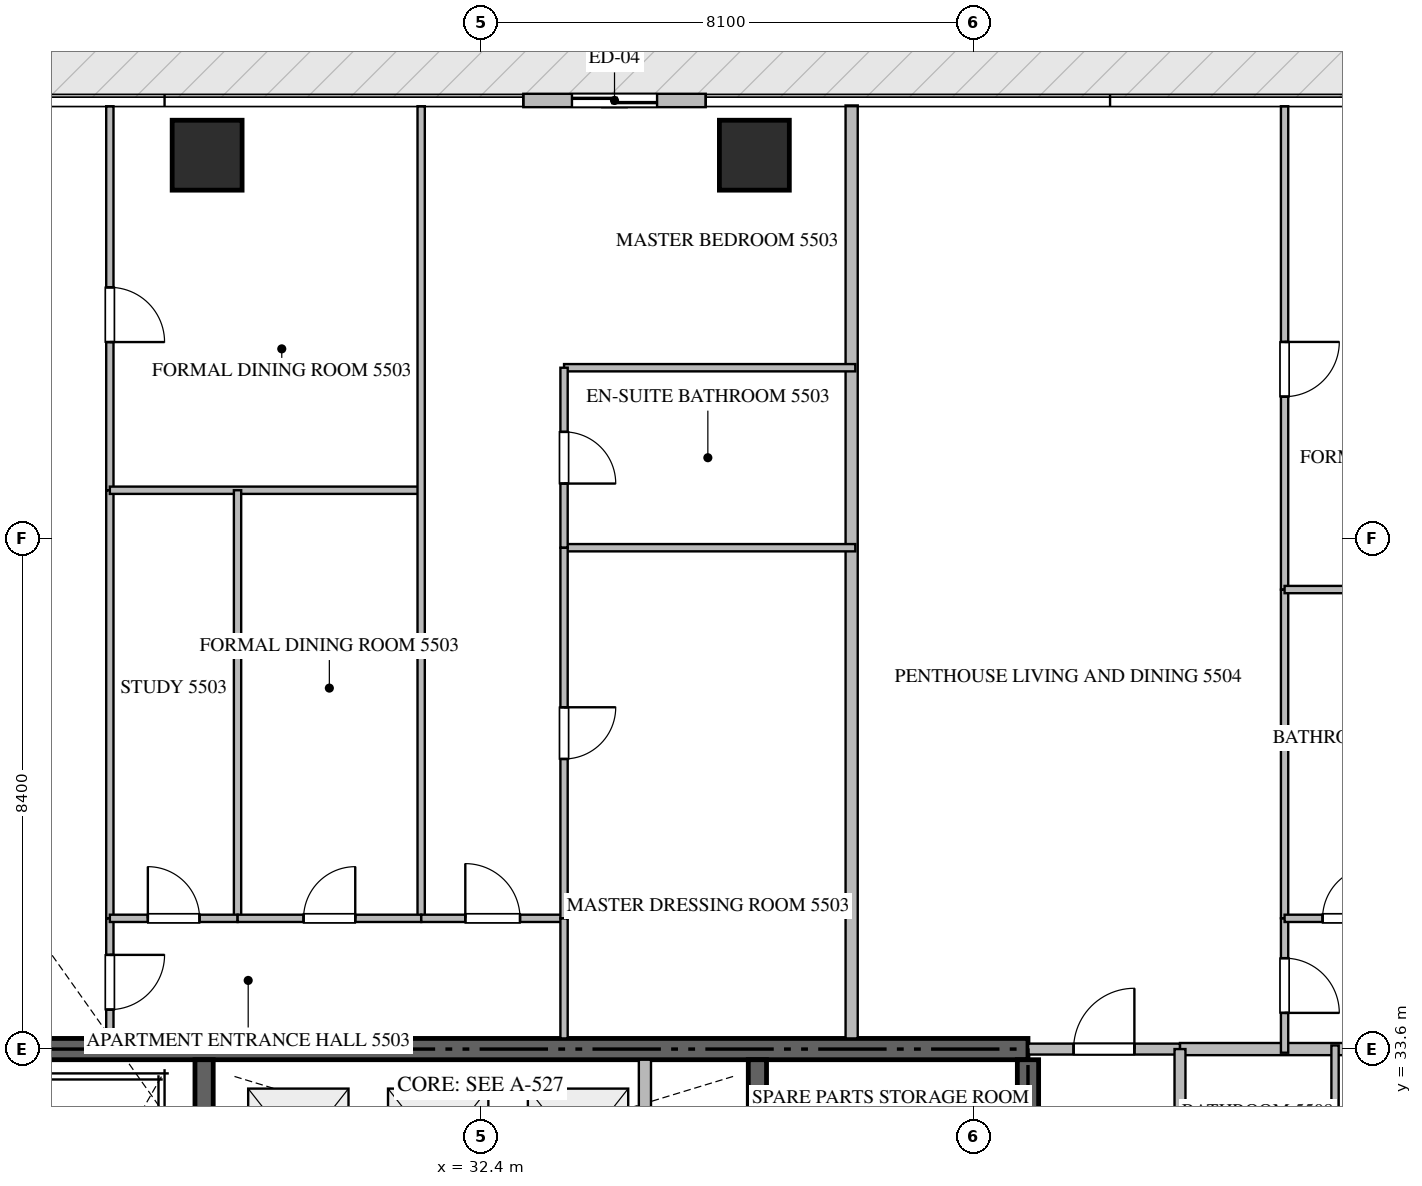
"""IFC4 building model, lengths in metres.
Left out: names, types, materials, properties, quantities, classifications, styles, units other than length and angle.
Written with IfcOpenShell. Run it as: python <this file> out.ifc"""

import sys

from ifc_helpers import new_model, si_unit, direction, frame, frame_2d, origin, origin_2d, place, context, subcontext, project, spatial, rectangle, extrude, source, transform, mapped, element, fill, save


model = new_model("IFC4")
c1 = context("Model", 3, precision=1e-05, world=origin(), true_north=direction((0.0, 1.0)))
c2 = subcontext(c1, "Body", "Model", "MODEL_VIEW")
j1 = project(units=[si_unit("LENGTHUNIT", "METRE"), si_unit("PLANEANGLEUNIT", "RADIAN")], contexts=[c1])
p1 = place(None, origin())
s1 = spatial("IfcSite", under=j1, at=p1, CompositionType="ELEMENT")
p2 = place(p1, origin())
s2 = spatial("IfcBuilding", under=s1, at=p2, CompositionType="ELEMENT")
p3 = place(p2, frame((0.0, 0.0, 222.0)))
s3 = spatial("IfcBuildingStorey", under=s2, at=p3, CompositionType="ELEMENT", Elevation=222.0)
p4 = place(p3, frame((41.4, 33.6, -0.26), z_axis=(0.0, 0.0, 1.0), x_axis=(-1.0, 0.0, 0.0)))
e1 = element("IfcWall", 1, at=p4, inside=s3, PredefinedType="SHEAR", context=c2, shape_type="SweptSolid", body=[
    extrude(rectangle(XDim=18.0, YDim=0.35, at=frame_2d((9.0, 0.0))), origin(), (0.0, 0.0, 1.0), 3.848),
])
p5 = place(p3, frame((41.4, 27.75, -0.26), z_axis=(0.0, 0.0, 1.0), x_axis=(0.0, 1.0, 0.0)))
e2 = element("IfcWall", 2, at=p5, inside=s3, PredefinedType="SHEAR", context=c2, shape_type="SweptSolid", body=[
    extrude(rectangle(XDim=5.675, YDim=0.35, at=frame_2d((2.837, 0.0))), origin(), (0.0, 0.0, 1.0), 3.848),
])
p6 = place(p3, frame((27.85, 23.55, -0.26), z_axis=(0.0, 0.0, 1.0), x_axis=(0.0, 1.0, 0.0)))
e3 = element("IfcWall", 3, at=p6, inside=s3, PredefinedType="SHEAR", context=c2, shape_type="SweptSolid", body=[
    extrude(rectangle(XDim=9.875, YDim=0.3, at=frame_2d((4.938, 0.0))), origin(), (0.0, 0.0, 1.0), 3.848),
])
p7 = place(p3, frame((36.95, 27.05, -0.26), z_axis=(0.0, 0.0, 1.0), x_axis=(0.0, 1.0, 0.0)))
e4 = element("IfcWall", 4, at=p7, inside=s3, PredefinedType="SHEAR", context=c2, shape_type="SweptSolid", body=[
    extrude(rectangle(XDim=6.375, YDim=0.3, at=frame_2d((3.188, 0.0))), origin(), (0.0, 0.0, 1.0), 3.848),
])
m1 = source(origin(), c2, "Body", "SweptSolid", [
    extrude(rectangle(XDim=1.15, YDim=1.15, at=origin_2d()), origin(), (0.0, 0.0, 1.0), 3.85),
])
for number, where, z_axis, x_axis in (
    (5, (27.9, 48.3, -0.26), (0.0, 0.0, 1.0), (1.0, 0.0, 0.0)),
    (6, (36.9, 48.3, -0.26), (0.0, 0.0, 1.0), (1.0, 0.0, 0.0)),
):
    element("IfcColumn", number, at=place(p3, frame(where, z_axis=z_axis, x_axis=x_axis)), inside=s3, PredefinedType="COLUMN", context=c2, shape_type="MappedRepresentation", body=[
        mapped(m1, transform((0.0, 0.0, 0.0), scale=1.0)),
    ])
p8 = place(p3, frame((36.1, 49.2, 0.0), z_axis=(0.0, 0.0, 1.0), x_axis=(-1.0, 0.0, 0.0)))
e7 = element("IfcWall", 7, at=p8, inside=s3, PredefinedType="ELEMENTEDWALL", context=c2, shape_type="SweptSolid", body=[
    extrude(rectangle(XDim=3.0, YDim=0.22, at=frame_2d((1.5, 0.0))), origin(), (0.0, 0.0, 1.0), 3.575),
])
p9 = place(p8, frame((0.8, 0.0, 0.0)))
e8 = element("IfcOpeningElement", 8, at=p9, cuts=e7, PredefinedType="OPENING", context=c2, shape_type="SweptSolid", body=[
    extrude(rectangle(XDim=1.4, YDim=2.25, at=frame_2d((0.7, 1.125))), frame((0.0, 0.12, 0.0), z_axis=(0.0, -1.0, 0.0), x_axis=(1.0, 0.0, 0.0)), (0.0, 0.0, 1.0), 0.24),
])
p10 = place(p3, frame((35.1, 30.75, 0.0), z_axis=(0.0, 0.0, 1.0), x_axis=(0.0, 1.0, 0.0)))
e9 = element("IfcWall", 9, at=p10, inside=s3, PredefinedType="STANDARD", context=c2, shape_type="SweptSolid", body=[
    extrude(rectangle(XDim=2.675, YDim=0.2, at=frame_2d((1.337, 0.0))), origin(), (0.0, 0.0, 1.0), 3.59),
])
p11 = place(p3, frame((38.5, 33.775, 0.0), z_axis=(0.0, 0.0, 1.0), x_axis=(0.0, 1.0, 0.0)))
e10 = element("IfcWall", 10, at=p11, inside=s3, PredefinedType="PARTITIONING", context=c2, shape_type="SweptSolid", body=[
    extrude(rectangle(XDim=15.343, YDim=0.2, at=frame_2d((7.671, 0.0))), origin(), (0.0, 0.0, 1.0), 3.59),
])
p12 = place(p3, frame((43.9, 33.6, 0.0), z_axis=(0.0, 0.0, 1.0), x_axis=(1.0, 0.0, 0.0)))
e11 = element("IfcWall", 11, at=p12, inside=s3, PredefinedType="PARTITIONING", context=c2, shape_type="SweptSolid", body=[
    extrude(rectangle(XDim=13.418, YDim=0.2, at=frame_2d((6.709, 0.0))), origin(), (0.0, 0.0, 1.0), 3.59),
])
p13 = place(p3, frame((41.402, 33.6, 0.0), z_axis=(0.0, 0.0, 1.0), x_axis=(1.0, 0.0, 0.0)))
e12 = element("IfcWall", 12, at=p13, inside=s3, PredefinedType="PARTITIONING", context=c2, shape_type="SweptSolid", body=[
    extrude(rectangle(XDim=2.496, YDim=0.18, at=frame_2d((1.248, 0.0))), origin(), (0.0, 0.0, 1.0), 3.59),
])
p14 = place(p13, frame((0.748, 0.0, 0.0)))
e13 = element("IfcOpeningElement", 13, at=p14, cuts=e12, PredefinedType="OPENING", context=c2, shape_type="SweptSolid", body=[
    extrude(rectangle(XDim=1.0, YDim=2.15, at=frame_2d((0.5, 1.075))), frame((0.0, 0.1, 0.0), z_axis=(0.0, -1.0, 0.0), x_axis=(1.0, 0.0, 0.0)), (0.0, 0.0, 1.0), 0.2),
])
p15 = place(p3, frame((43.9, 16.8, 0.0), z_axis=(0.0, 0.0, 1.0), x_axis=(0.0, 1.0, 0.0)))
e14 = element("IfcWall", 14, at=p15, inside=s3, PredefinedType="PARTITIONING", context=c2, shape_type="SweptSolid", body=[
    extrude(rectangle(XDim=16.8, YDim=0.18, at=frame_2d((8.4, 0.0))), origin(), (0.0, 0.0, 1.0), 3.59),
])
p16 = place(p15, frame((2.575, 0.0, 0.0)))
e15 = element("IfcOpeningElement", 15, at=p16, cuts=e14, PredefinedType="OPENING", context=c2, shape_type="SweptSolid", body=[
    extrude(rectangle(XDim=1.0, YDim=2.15, at=frame_2d((0.5, 1.075))), frame((0.0, 0.1, 0.0), z_axis=(0.0, -1.0, 0.0), x_axis=(1.0, 0.0, 0.0)), (0.0, 0.0, 1.0), 0.2),
])
p17 = place(p15, frame((10.997, 0.0, 0.0)))
e16 = element("IfcOpeningElement", 16, at=p17, cuts=e14, PredefinedType="OPENING", context=c2, shape_type="SweptSolid", body=[
    extrude(rectangle(XDim=1.0, YDim=2.15, at=frame_2d((0.5, 1.075))), frame((0.0, 0.1, 0.0), z_axis=(0.0, -1.0, 0.0), x_axis=(1.0, 0.0, 0.0)), (0.0, 0.0, 1.0), 0.2),
])
p18 = place(p3, frame((26.3, 35.75, 0.0), z_axis=(0.0, 0.0, 1.0), x_axis=(0.0, -1.0, 0.0)))
e17 = element("IfcWall", 17, at=p18, inside=s3, PredefinedType="PARTITIONING", context=c2, shape_type="SweptSolid", body=[
    extrude(rectangle(XDim=1.975, YDim=0.12, at=frame_2d((0.988, 0.0))), origin(), (0.0, 0.0, 1.0), 3.59),
])
p19 = place(p18, frame((0.601, 0.0, 0.0)))
e18 = element("IfcOpeningElement", 18, at=p19, cuts=e17, PredefinedType="OPENING", context=c2, shape_type="SweptSolid", body=[
    extrude(rectangle(XDim=0.9, YDim=2.1, at=frame_2d((0.45, 1.05))), frame((0.0, 0.07, 0.0), z_axis=(0.0, -1.0, 0.0), x_axis=(1.0, 0.0, 0.0)), (0.0, 0.0, 1.0), 0.14),
])
p20 = place(p3, frame((26.3, 49.105, 0.0), z_axis=(0.0, 0.0, 1.0), x_axis=(0.0, -1.0, 0.0)))
e19 = element("IfcWall", 19, at=p20, inside=s3, PredefinedType="PARTITIONING", context=c2, shape_type="SweptSolid", body=[
    extrude(rectangle(XDim=6.315, YDim=0.12, at=frame_2d((3.157, 0.0))), origin(), (0.0, 0.0, 1.0), 3.59),
])
p21 = place(p20, frame((2.978, 0.0, 0.0)))
e20 = element("IfcOpeningElement", 20, at=p21, cuts=e19, PredefinedType="OPENING", context=c2, shape_type="SweptSolid", body=[
    extrude(rectangle(XDim=0.9, YDim=2.1, at=frame_2d((0.45, 1.05))), frame((0.0, 0.07, 0.0), z_axis=(0.0, -1.0, 0.0), x_axis=(1.0, 0.0, 0.0)), (0.0, 0.0, 1.0), 0.14),
])
p22 = place(p3, frame((26.3, 42.788, 0.0), z_axis=(0.0, 0.0, 1.0), x_axis=(0.0, -1.0, 0.0)))
e21 = element("IfcWall", 21, at=p22, inside=s3, PredefinedType="PARTITIONING", context=c2, shape_type="SweptSolid", body=[
    extrude(rectangle(XDim=7.036, YDim=0.12, at=frame_2d((3.518, 0.0))), origin(), (0.0, 0.0, 1.0), 3.59),
])
p23 = place(p3, frame((26.3, 42.79, 0.0), z_axis=(0.0, 0.0, 1.0), x_axis=(1.0, 0.0, 0.0)))
e22 = element("IfcWall", 22, at=p23, inside=s3, PredefinedType="PARTITIONING", context=c2, shape_type="SweptSolid", body=[
    extrude(rectangle(XDim=5.12, YDim=0.12, at=frame_2d((2.56, 0.0))), origin(), (0.0, 0.0, 1.0), 3.59),
])
p24 = place(p3, frame((31.42, 49.105, 0.0), z_axis=(0.0, 0.0, 1.0), x_axis=(0.0, -1.0, 0.0)))
e23 = element("IfcWall", 23, at=p24, inside=s3, PredefinedType="PARTITIONING", context=c2, shape_type="SweptSolid", body=[
    extrude(rectangle(XDim=13.355, YDim=0.12, at=frame_2d((6.677, 0.0))), origin(), (0.0, 0.0, 1.0), 3.59),
])
p25 = place(p3, frame((28.4, 42.79, 0.0), z_axis=(0.0, 0.0, 1.0), x_axis=(0.0, -1.0, 0.0)))
e24 = element("IfcWall", 24, at=p25, inside=s3, PredefinedType="PARTITIONING", context=c2, shape_type="SweptSolid", body=[
    extrude(rectangle(XDim=7.04, YDim=0.12, at=frame_2d((3.52, 0.0))), origin(), (0.0, 0.0, 1.0), 3.59),
])
p26 = place(p3, frame((26.3, 35.75, 0.0), z_axis=(0.0, 0.0, 1.0), x_axis=(1.0, 0.0, 0.0)))
e25 = element("IfcWall", 25, at=p26, inside=s3, PredefinedType="PARTITIONING", context=c2, shape_type="SweptSolid", body=[
    extrude(rectangle(XDim=2.1, YDim=0.12, at=frame_2d((1.05, 0.0))), origin(), (0.0, 0.0, 1.0), 3.59),
])
p27 = place(p26, frame((0.625, 0.0, 0.0)))
e26 = element("IfcOpeningElement", 26, at=p27, cuts=e25, PredefinedType="OPENING", context=c2, shape_type="SweptSolid", body=[
    extrude(rectangle(XDim=0.85, YDim=2.1, at=frame_2d((0.425, 1.05))), frame((0.0, 0.07, 0.0), z_axis=(0.0, -1.0, 0.0), x_axis=(1.0, 0.0, 0.0)), (0.0, 0.0, 1.0), 0.14),
])
p28 = place(p3, frame((28.402, 35.75, 0.0), z_axis=(0.0, 0.0, 1.0), x_axis=(1.0, 0.0, 0.0)))
e27 = element("IfcWall", 27, at=p28, inside=s3, PredefinedType="PARTITIONING", context=c2, shape_type="SweptSolid", body=[
    extrude(rectangle(XDim=3.018, YDim=0.12, at=frame_2d((1.509, 0.0))), origin(), (0.0, 0.0, 1.0), 3.59),
])
p29 = place(p28, frame((1.084, 0.0, 0.0)))
e28 = element("IfcOpeningElement", 28, at=p29, cuts=e27, PredefinedType="OPENING", context=c2, shape_type="SweptSolid", body=[
    extrude(rectangle(XDim=0.85, YDim=2.1, at=frame_2d((0.425, 1.05))), frame((0.0, 0.07, 0.0), z_axis=(0.0, -1.0, 0.0), x_axis=(1.0, 0.0, 0.0)), (0.0, 0.0, 1.0), 0.14),
])
p30 = place(p3, frame((31.422, 35.75, 0.0), z_axis=(0.0, 0.0, 1.0), x_axis=(1.0, 0.0, 0.0)))
e29 = element("IfcWall", 29, at=p30, inside=s3, PredefinedType="PARTITIONING", context=c2, shape_type="SweptSolid", body=[
    extrude(rectangle(XDim=2.348, YDim=0.12, at=frame_2d((1.174, 0.0))), origin(), (0.0, 0.0, 1.0), 3.59),
])
p31 = place(p30, frame((0.724, 0.0, 0.0)))
e30 = element("IfcOpeningElement", 30, at=p31, cuts=e29, PredefinedType="OPENING", context=c2, shape_type="SweptSolid", body=[
    extrude(rectangle(XDim=0.9, YDim=2.1, at=frame_2d((0.45, 1.05))), frame((0.0, 0.07, 0.0), z_axis=(0.0, -1.0, 0.0), x_axis=(1.0, 0.0, 0.0)), (0.0, 0.0, 1.0), 0.14),
])
for number, where, z_axis, x_axis in (
    (31, (33.77, 44.805, 0.0), (0.0, 0.0, 1.0), (1.0, 0.0, 0.0)),
    (32, (33.77, 41.845, 0.0), (0.0, 0.0, 1.0), (1.0, 0.0, 0.0)),
):
    element("IfcWall", number, at=place(p3, frame(where, z_axis=z_axis, x_axis=x_axis)), inside=s3, PredefinedType="PARTITIONING", context=c2, shape_type="SweptSolid", body=[
        extrude(rectangle(XDim=4.79, YDim=0.12, at=frame_2d((2.395, 0.0))), origin(), (0.0, 0.0, 1.0), 3.59),
    ])
p32 = place(p3, frame((33.77, 44.805, 0.0), z_axis=(0.0, 0.0, 1.0), x_axis=(0.0, -1.0, 0.0)))
e33 = element("IfcWall", 33, at=p32, inside=s3, PredefinedType="PARTITIONING", context=c2, shape_type="SweptSolid", body=[
    extrude(rectangle(XDim=2.96, YDim=0.12, at=frame_2d((1.48, 0.0))), origin(), (0.0, 0.0, 1.0), 3.59),
])
p33 = place(p32, frame((1.055, 0.0, 0.0)))
e34 = element("IfcOpeningElement", 34, at=p33, cuts=e33, PredefinedType="OPENING", context=c2, shape_type="SweptSolid", body=[
    extrude(rectangle(XDim=0.85, YDim=2.1, at=frame_2d((0.425, 1.05))), frame((0.0, 0.07, 0.0), z_axis=(0.0, -1.0, 0.0), x_axis=(1.0, 0.0, 0.0)), (0.0, 0.0, 1.0), 0.14),
])
p34 = place(p3, frame((33.77, 41.843, 0.0), z_axis=(0.0, 0.0, 1.0), x_axis=(0.0, -1.0, 0.0)))
e35 = element("IfcWall", 35, at=p34, inside=s3, PredefinedType="PARTITIONING", context=c2, shape_type="SweptSolid", body=[
    extrude(rectangle(XDim=6.093, YDim=0.12, at=frame_2d((3.046, 0.0))), origin(), (0.0, 0.0, 1.0), 3.59),
])
p35 = place(p34, frame((2.622, 0.0, 0.0)))
e36 = element("IfcOpeningElement", 36, at=p35, cuts=e35, PredefinedType="OPENING", context=c2, shape_type="SweptSolid", body=[
    extrude(rectangle(XDim=0.85, YDim=2.1, at=frame_2d((0.425, 1.05))), frame((0.0, 0.07, 0.0), z_axis=(0.0, -1.0, 0.0), x_axis=(1.0, 0.0, 0.0)), (0.0, 0.0, 1.0), 0.14),
])
p36 = place(p3, frame((33.77, 35.748, 0.0), z_axis=(0.0, 0.0, 1.0), x_axis=(0.0, -1.0, 0.0)))
e37 = element("IfcWall", 37, at=p36, inside=s3, PredefinedType="PARTITIONING", context=c2, shape_type="SweptSolid", body=[
    extrude(rectangle(XDim=1.973, YDim=0.12, at=frame_2d((0.987, 0.0))), origin(), (0.0, 0.0, 1.0), 3.59),
])
p37 = place(p3, frame((45.62, 35.75, 0.0), z_axis=(0.0, 0.0, 1.0), x_axis=(0.0, -1.0, 0.0)))
e38 = element("IfcWall", 38, at=p37, inside=s3, PredefinedType="PARTITIONING", context=c2, shape_type="SweptSolid", body=[
    extrude(rectangle(XDim=2.21, YDim=0.12, at=frame_2d((1.105, 0.0))), origin(), (0.0, 0.0, 1.0), 3.59),
])
p38 = place(p37, frame((0.655, 0.0, 0.0)))
e39 = element("IfcOpeningElement", 39, at=p38, cuts=e38, PredefinedType="OPENING", context=c2, shape_type="SweptSolid", body=[
    extrude(rectangle(XDim=0.9, YDim=2.1, at=frame_2d((0.45, 1.05))), frame((0.0, 0.07, 0.0), z_axis=(0.0, -1.0, 0.0), x_axis=(1.0, 0.0, 0.0)), (0.0, 0.0, 1.0), 0.14),
])
p39 = place(p3, frame((45.62, 49.105, 0.0), z_axis=(0.0, 0.0, 1.0), x_axis=(0.0, -1.0, 0.0)))
e40 = element("IfcWall", 40, at=p39, inside=s3, PredefinedType="PARTITIONING", context=c2, shape_type="SweptSolid", body=[
    extrude(rectangle(XDim=7.948, YDim=0.12, at=frame_2d((3.974, 0.0))), origin(), (0.0, 0.0, 1.0), 3.59),
])
p40 = place(p39, frame((3.876, 0.0, 0.0)))
e41 = element("IfcOpeningElement", 41, at=p40, cuts=e40, PredefinedType="OPENING", context=c2, shape_type="SweptSolid", body=[
    extrude(rectangle(XDim=0.9, YDim=2.1, at=frame_2d((0.45, 1.05))), frame((0.0, 0.07, 0.0), z_axis=(0.0, -1.0, 0.0), x_axis=(1.0, 0.0, 0.0)), (0.0, 0.0, 1.0), 0.14),
])
p41 = place(p3, frame((45.62, 41.155, 0.0), z_axis=(0.0, 0.0, 1.0), x_axis=(0.0, -1.0, 0.0)))
e42 = element("IfcWall", 42, at=p41, inside=s3, PredefinedType="PARTITIONING", context=c2, shape_type="SweptSolid", body=[
    extrude(rectangle(XDim=5.403, YDim=0.12, at=frame_2d((2.702, 0.0))), origin(), (0.0, 0.0, 1.0), 3.59),
])
p42 = place(p3, frame((45.62, 41.157, 0.0), z_axis=(0.0, 0.0, 1.0), x_axis=(1.0, 0.0, 0.0)))
e43 = element("IfcWall", 43, at=p42, inside=s3, PredefinedType="PARTITIONING", context=c2, shape_type="SweptSolid", body=[
    extrude(rectangle(XDim=4.88, YDim=0.12, at=frame_2d((2.44, 0.0))), origin(), (0.0, 0.0, 1.0), 3.59),
])
p43 = place(p3, frame((45.62, 35.75, 0.0), z_axis=(0.0, 0.0, 1.0), x_axis=(1.0, 0.0, 0.0)))
e44 = element("IfcWall", 44, at=p43, inside=s3, PredefinedType="PARTITIONING", context=c2, shape_type="SweptSolid", body=[
    extrude(rectangle(XDim=2.1, YDim=0.12, at=frame_2d((1.05, 0.0))), origin(), (0.0, 0.0, 1.0), 3.59),
])
p44 = place(p43, frame((0.625, 0.0, 0.0)))
e45 = element("IfcOpeningElement", 45, at=p44, cuts=e44, PredefinedType="OPENING", context=c2, shape_type="SweptSolid", body=[
    extrude(rectangle(XDim=0.85, YDim=2.1, at=frame_2d((0.425, 1.05))), frame((0.0, 0.07, 0.0), z_axis=(0.0, -1.0, 0.0), x_axis=(1.0, 0.0, 0.0)), (0.0, 0.0, 1.0), 0.14),
])
p45 = place(p3, frame((46.45, 31.0, 0.0), z_axis=(0.0, 0.0, 1.0), x_axis=(0.0, 1.0, 0.0)))
e46 = element("IfcWall", 46, at=p45, inside=s3, PredefinedType="PARTITIONING", context=c2, shape_type="SweptSolid", body=[
    extrude(rectangle(XDim=2.66, YDim=0.12, at=frame_2d((1.33, 0.0))), origin(), (0.0, 0.0, 1.0), 3.59),
])
m2 = source(origin(), c2, "Body", "SweptSolid", [
    extrude(rectangle(XDim=1.4, YDim=2.25, at=frame_2d((0.7, 1.125))), frame((0.0, 0.025, 0.0), z_axis=(0.0, -1.0, 0.0), x_axis=(1.0, 0.0, 0.0)), (0.0, 0.0, 1.0), 0.05),
])
p46 = place(p9, origin())
e47 = element("IfcDoor", 47, at=p46, inside=s3, OperationType="SLIDING_TO_LEFT", PredefinedType="DOOR", context=c2, shape_type="MappedRepresentation", body=[
    mapped(m2, transform((0.0, 0.0, 0.0), scale=1.0)),
])
fill(e8, e47)
m3 = source(origin(), c2, "Body", "SweptSolid", [
    extrude(rectangle(XDim=1.0, YDim=2.15, at=frame_2d((0.5, 1.075))), frame((0.0, 0.025, 0.0), z_axis=(0.0, -1.0, 0.0), x_axis=(1.0, 0.0, 0.0)), (0.0, 0.0, 1.0), 0.05),
])
p47 = place(p14, origin())
e48 = element("IfcDoor", 48, at=p47, inside=s3, OperationType="SINGLE_SWING_RIGHT", PredefinedType="DOOR", context=c2, shape_type="MappedRepresentation", body=[
    mapped(m3, transform((0.0, 0.0, 0.0), scale=1.0)),
])
fill(e13, e48)
m4 = source(origin(), c2, "Body", "SweptSolid", [
    extrude(rectangle(XDim=0.9, YDim=2.1, at=frame_2d((0.45, 1.05))), frame((0.0, 0.025, 0.0), z_axis=(0.0, -1.0, 0.0), x_axis=(1.0, 0.0, 0.0)), (0.0, 0.0, 1.0), 0.05),
])
p48 = place(p19, origin())
e49 = element("IfcDoor", 49, at=p48, inside=s3, OperationType="SINGLE_SWING_LEFT", PredefinedType="DOOR", context=c2, shape_type="MappedRepresentation", body=[
    mapped(m4, transform((0.0, 0.0, 0.0), scale=1.0)),
])
fill(e18, e49)
p49 = place(p21, origin())
e50 = element("IfcDoor", 50, at=p49, inside=s3, OperationType="SINGLE_SWING_RIGHT", PredefinedType="DOOR", context=c2, shape_type="MappedRepresentation", body=[
    mapped(m4, transform((0.0, 0.0, 0.0), scale=1.0)),
])
fill(e20, e50)
m5 = source(origin(), c2, "Body", "SweptSolid", [
    extrude(rectangle(XDim=0.85, YDim=2.1, at=frame_2d((0.425, 1.05))), frame((0.0, 0.025, 0.0), z_axis=(0.0, -1.0, 0.0), x_axis=(1.0, 0.0, 0.0)), (0.0, 0.0, 1.0), 0.05),
])
p50 = place(p27, origin())
e51 = element("IfcDoor", 51, at=p50, inside=s3, OperationType="SINGLE_SWING_LEFT", PredefinedType="DOOR", context=c2, shape_type="MappedRepresentation", body=[
    mapped(m5, transform((0.0, 0.0, 0.0), scale=1.0)),
])
fill(e26, e51)
p51 = place(p29, origin())
e52 = element("IfcDoor", 52, at=p51, inside=s3, OperationType="SINGLE_SWING_RIGHT", PredefinedType="DOOR", context=c2, shape_type="MappedRepresentation", body=[
    mapped(m5, transform((0.0, 0.0, 0.0), scale=1.0)),
])
fill(e28, e52)
p52 = place(p31, origin())
e53 = element("IfcDoor", 53, at=p52, inside=s3, OperationType="SINGLE_SWING_LEFT", PredefinedType="DOOR", context=c2, shape_type="MappedRepresentation", body=[
    mapped(m4, transform((0.0, 0.0, 0.0), scale=1.0)),
])
fill(e30, e53)
p53 = place(p33, origin())
e54 = element("IfcDoor", 54, at=p53, inside=s3, OperationType="SINGLE_SWING_RIGHT", PredefinedType="DOOR", context=c2, shape_type="MappedRepresentation", body=[
    mapped(m5, transform((0.0, 0.0, 0.0), scale=1.0)),
])
fill(e34, e54)
p54 = place(p35, origin())
e55 = element("IfcDoor", 55, at=p54, inside=s3, OperationType="SINGLE_SWING_LEFT", PredefinedType="DOOR", context=c2, shape_type="MappedRepresentation", body=[
    mapped(m5, transform((0.0, 0.0, 0.0), scale=1.0)),
])
fill(e36, e55)
p55 = place(p38, origin())
e56 = element("IfcDoor", 56, at=p55, inside=s3, OperationType="SINGLE_SWING_RIGHT", PredefinedType="DOOR", context=c2, shape_type="MappedRepresentation", body=[
    mapped(m4, transform((0.0, 0.0, 0.0), scale=1.0)),
])
fill(e39, e56)
p56 = place(p40, origin())
e57 = element("IfcDoor", 57, at=p56, inside=s3, OperationType="SINGLE_SWING_LEFT", PredefinedType="DOOR", context=c2, shape_type="MappedRepresentation", body=[
    mapped(m4, transform((0.0, 0.0, 0.0), scale=1.0)),
])
fill(e41, e57)
p57 = place(p44, origin())
e58 = element("IfcDoor", 58, at=p57, inside=s3, OperationType="SINGLE_SWING_RIGHT", PredefinedType="DOOR", context=c2, shape_type="MappedRepresentation", body=[
    mapped(m5, transform((0.0, 0.0, 0.0), scale=1.0)),
])
fill(e45, e58)
save(model, sys.argv[1])
